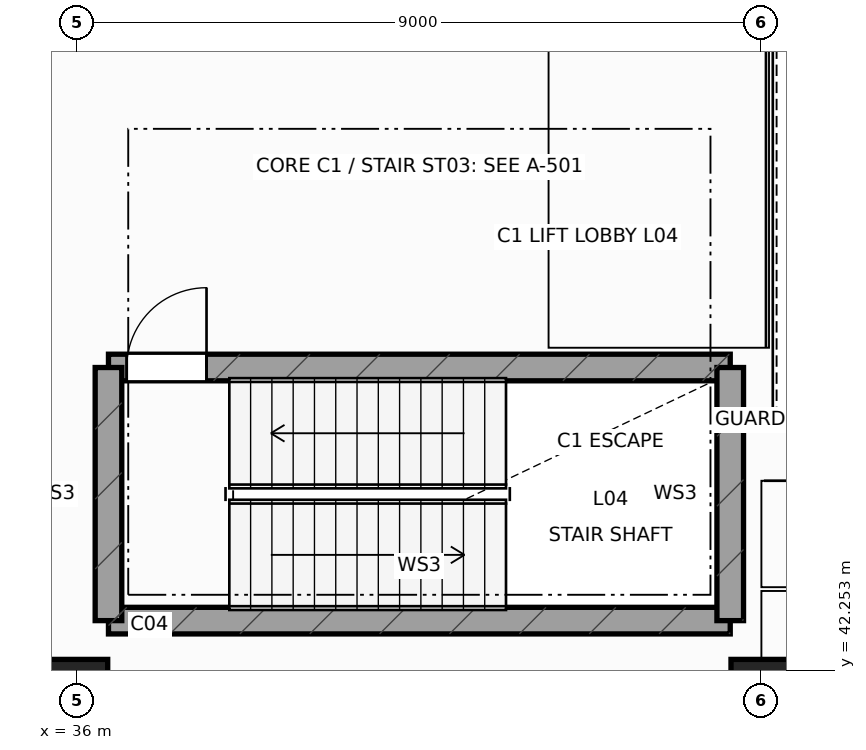
"""IFC4 building model, lengths in metres.
Left out: names, types, materials, properties, quantities, classifications, styles, units other than length and angle.
Written with IfcOpenShell. Run it as: python <this file> out.ifc"""

import sys

from ifc_helpers import new_model, si_unit, direction, frame, frame_2d, origin, origin_2d, place, context, subcontext, project, spatial, rectangle, extrude, element, fill, save


model = new_model("IFC4")
c1 = context("Model", 3, precision=1e-05, world=origin(), true_north=direction((0.0, 1.0)))
c2 = subcontext(c1, "Body", "Model", "MODEL_VIEW")
j1 = project(units=[si_unit("LENGTHUNIT", "METRE"), si_unit("PLANEANGLEUNIT", "RADIAN")], contexts=[c1])
p1 = place(None, origin())
s1 = spatial("IfcSite", under=j1, at=p1, CompositionType="ELEMENT")
p2 = place(p1, origin())
s2 = spatial("IfcBuilding", under=s1, at=p2, CompositionType="ELEMENT")
p3 = place(p2, frame((0.0, 0.0, 21.6)))
s3 = spatial("IfcBuildingStorey", under=s2, at=p3, CompositionType="ELEMENT", Elevation=21.6)
for number, where, z_axis, x_axis in (
    (1, (36.0, 42.0, 0.0), (0.0, 0.0, 1.0), (1.0, 0.0, 0.0)),
    (2, (45.0, 42.0, 0.0), (0.0, 0.0, 1.0), (1.0, 0.0, 0.0)),
):
    element("IfcColumn", number, at=place(p3, frame(where, z_axis=z_axis, x_axis=x_axis)), inside=s3, PredefinedType="COLUMN", context=c2, shape_type="SweptSolid", body=[
        extrude(rectangle(XDim=0.8, YDim=0.8, at=origin_2d()), origin(), (0.0, 0.0, 1.0), 4.8),
    ])
p4 = place(p3, frame((36.41, 42.91, 0.0), z_axis=(0.0, 0.0, 1.0), x_axis=(1.0, 0.0, 0.0)))
e3 = element("IfcWall", 3, at=p4, inside=s3, PredefinedType="SHEAR", context=c2, shape_type="SweptSolid", body=[
    extrude(rectangle(XDim=8.18, YDim=0.35, at=frame_2d((4.09, 0.0))), origin(), (0.0, 0.0, 1.0), 4.54),
])
p5 = place(p3, frame((36.41, 46.24, 0.0), z_axis=(0.0, 0.0, 1.0), x_axis=(1.0, 0.0, 0.0)))
e4 = element("IfcWall", 4, at=p5, inside=s3, PredefinedType="SHEAR", context=c2, shape_type="SweptSolid", body=[
    extrude(rectangle(XDim=8.18, YDim=0.35, at=frame_2d((4.09, 0.0))), origin(), (0.0, 0.0, 1.0), 4.54),
])
p6 = place(p5, frame((0.24, 0.0, 0.0)))
e5 = element("IfcOpeningElement", 5, at=p6, cuts=e4, PredefinedType="OPENING", context=c2, shape_type="SweptSolid", body=[
    extrude(rectangle(XDim=1.05, YDim=2.18, at=frame_2d((0.525, 1.09))), frame((0.0, 0.185, 0.0), z_axis=(0.0, -1.0, 0.0), x_axis=(1.0, 0.0, 0.0)), (0.0, 0.0, 1.0), 0.37),
])
for number, where, z_axis, x_axis in (
    (6, (36.41, 42.91, 0.0), (0.0, 0.0, 1.0), (0.0, 1.0, 0.0)),
    (7, (44.59, 42.91, 0.0), (0.0, 0.0, 1.0), (0.0, 1.0, 0.0)),
):
    element("IfcWall", number, at=place(p3, frame(where, z_axis=z_axis, x_axis=x_axis)), inside=s3, PredefinedType="SHEAR", context=c2, shape_type="SweptSolid", body=[
        extrude(rectangle(XDim=3.33, YDim=0.35, at=frame_2d((1.665, 0.0))), origin(), (0.0, 0.0, 1.0), 4.54),
    ])
p7 = place(p6, origin())
e8 = element("IfcDoor", 8, at=p7, inside=s3, OperationType="SINGLE_SWING_RIGHT", PredefinedType="DOOR", context=c2, shape_type="SweptSolid", body=[
    extrude(rectangle(XDim=1.05, YDim=2.18, at=frame_2d((0.525, 1.09))), frame((0.0, 0.025, 0.0), z_axis=(0.0, -1.0, 0.0), x_axis=(1.0, 0.0, 0.0)), (0.0, 0.0, 1.0), 0.05),
])
fill(e5, e8)
save(model, sys.argv[1])
